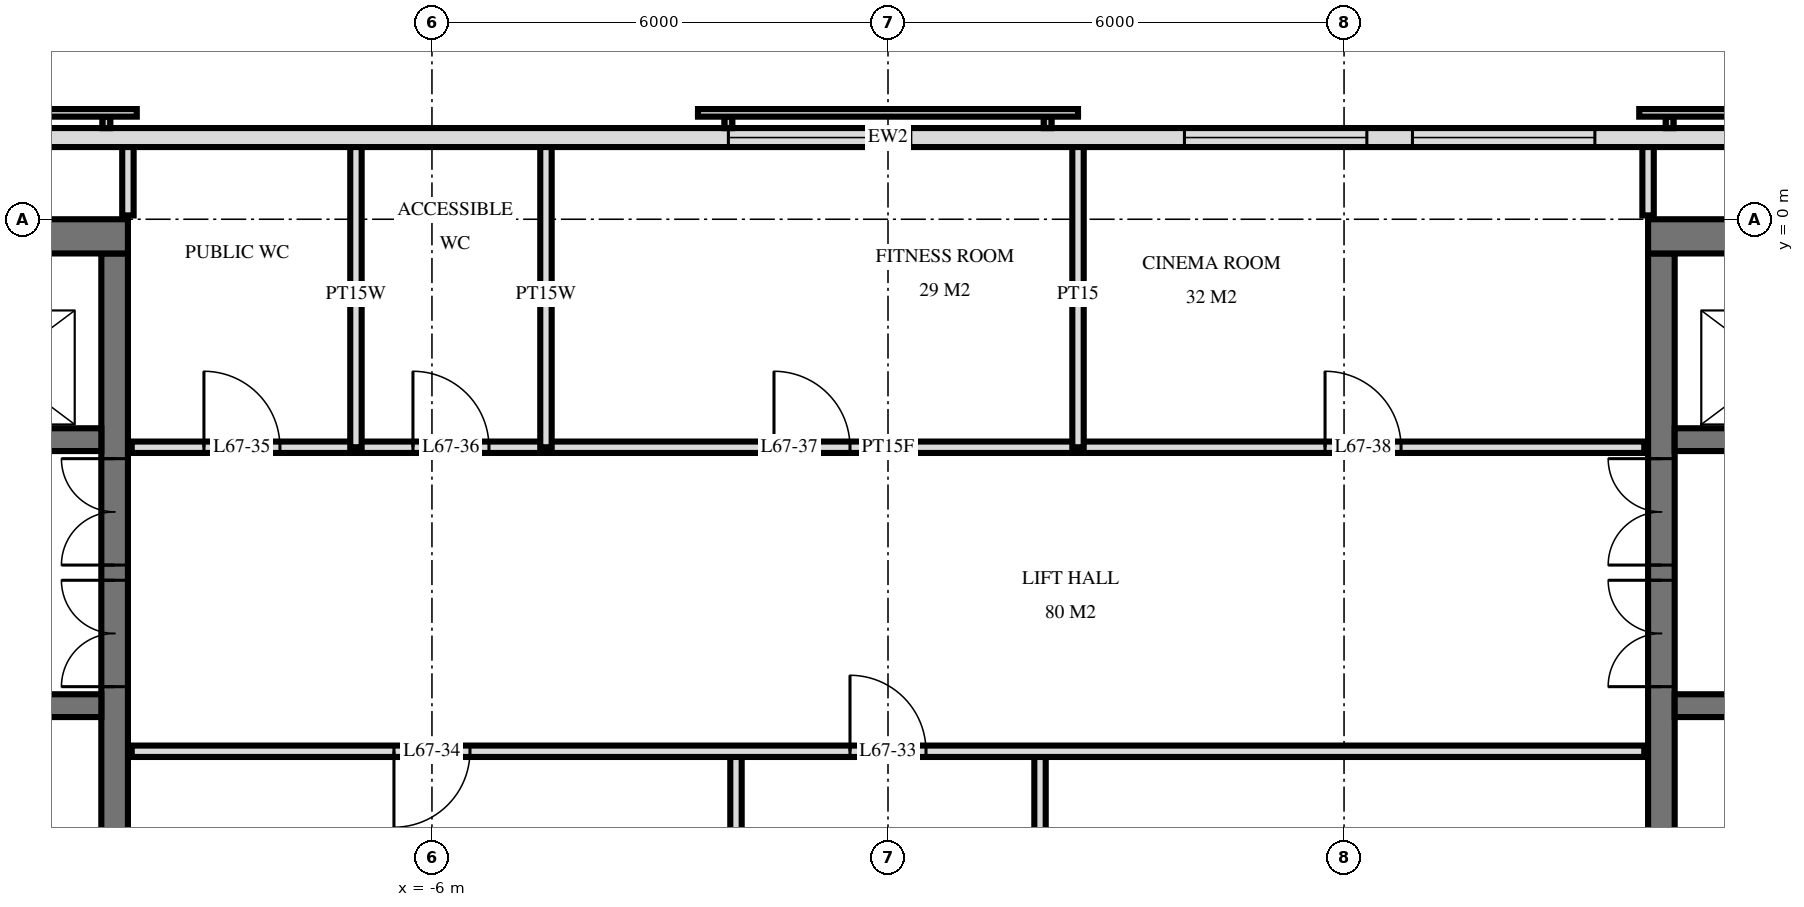
"""IFC4 building model, lengths in metres.
Left out: names, types, materials, properties, quantities, classifications, styles, units other than length and angle.
Written with IfcOpenShell. Run it as: python <this file> out.ifc"""

import sys

from ifc_helpers import new_model, si_unit, direction, frame, frame_2d, origin, place, context, subcontext, project, spatial, rectangle, extrude, element, fill, save


model = new_model("IFC4")
c1 = context("Model", 3, precision=1e-05, world=origin(), true_north=direction((0.0, 1.0)))
c2 = subcontext(c1, "Body", "Model", "MODEL_VIEW")
j1 = project(units=[si_unit("LENGTHUNIT", "METRE"), si_unit("PLANEANGLEUNIT", "RADIAN")], contexts=[c1])
p1 = place(None, origin())
s1 = spatial("IfcSite", under=j1, at=p1, CompositionType="ELEMENT")
p2 = place(p1, origin())
s2 = spatial("IfcBuilding", under=s1, at=p2, CompositionType="ELEMENT")
p3 = place(p2, frame((0.0, 0.0, 256.1)))
s3 = spatial("IfcBuildingStorey", under=s2, at=p3, CompositionType="ELEMENT", Elevation=256.1)
p4 = place(p3, frame((-19.5, -0.225, 0.0), z_axis=(0.0, 0.0, 1.0), x_axis=(1.0, 0.0, 0.0)))
e1 = element("IfcWall", 1, at=p4, inside=s3, PredefinedType="SHEAR", context=c2, shape_type="SweptSolid", body=[
    extrude(rectangle(XDim=9.5, YDim=0.45, at=frame_2d((4.75, 0.0))), origin(), (0.0, 0.0, 1.0), 3.5),
])
p5 = place(p3, frame((-10.175, -14.55, 0.0), z_axis=(0.0, 0.0, 1.0), x_axis=(0.0, 1.0, 0.0)))
e2 = element("IfcWall", 2, at=p5, inside=s3, PredefinedType="SHEAR", context=c2, shape_type="SweptSolid", body=[
    extrude(rectangle(XDim=14.1, YDim=0.35, at=frame_2d((7.05, 0.0))), origin(), (0.0, 0.0, 1.0), 3.5),
])
p6 = place(p5, frame((8.4, 0.0, 0.0)))
e3 = element("IfcOpeningElement", 3, at=p6, cuts=e2, PredefinedType="OPENING", context=c2, shape_type="SweptSolid", body=[
    extrude(rectangle(XDim=1.4, YDim=2.4, at=frame_2d((0.7, 1.2))), frame((0.0, 0.185, 0.0), z_axis=(0.0, -1.0, 0.0), x_axis=(1.0, 0.0, 0.0)), (0.0, 0.0, 1.0), 0.37),
])
p7 = place(p5, frame((10.0, 0.0, 0.0)))
e4 = element("IfcOpeningElement", 4, at=p7, cuts=e2, PredefinedType="OPENING", context=c2, shape_type="SweptSolid", body=[
    extrude(rectangle(XDim=1.4, YDim=2.4, at=frame_2d((0.7, 1.2))), frame((0.0, 0.185, 0.0), z_axis=(0.0, -1.0, 0.0), x_axis=(1.0, 0.0, 0.0)), (0.0, 0.0, 1.0), 0.37),
])
p8 = place(p5, frame((4.0, 0.0, 0.0)))
e5 = element("IfcOpeningElement", 5, at=p8, cuts=e2, PredefinedType="OPENING", context=c2, shape_type="SweptSolid", body=[
    extrude(rectangle(XDim=1.2, YDim=2.1, at=frame_2d((0.6, 1.05))), frame((0.0, 0.185, 0.0), z_axis=(0.0, -1.0, 0.0), x_axis=(1.0, 0.0, 0.0)), (0.0, 0.0, 1.0), 0.37),
])
p9 = place(p3, frame((-19.05, -2.9, 0.0), z_axis=(0.0, 0.0, 1.0), x_axis=(1.0, 0.0, 0.0)))
e6 = element("IfcWall", 6, at=p9, inside=s3, PredefinedType="SHEAR", context=c2, shape_type="SweptSolid", body=[
    extrude(rectangle(XDim=8.7, YDim=0.3, at=frame_2d((4.35, 0.0))), origin(), (0.0, 0.0, 1.0), 3.5),
])
p10 = place(p9, frame((6.8, 0.0, 0.0)))
e7 = element("IfcOpeningElement", 7, at=p10, cuts=e6, PredefinedType="OPENING", context=c2, shape_type="SweptSolid", body=[
    extrude(rectangle(XDim=1.1, YDim=2.1, at=frame_2d((0.55, 1.05))), frame((0.0, 0.16, 0.0), z_axis=(0.0, -1.0, 0.0), x_axis=(1.0, 0.0, 0.0)), (0.0, 0.0, 1.0), 0.32),
])
p11 = place(p9, frame((3.8, 0.0, 0.0)))
e8 = element("IfcOpeningElement", 8, at=p11, cuts=e6, PredefinedType="OPENING", context=c2, shape_type="SweptSolid", body=[
    extrude(rectangle(XDim=1.1, YDim=2.1, at=frame_2d((0.55, 1.05))), frame((0.0, 0.16, 0.0), z_axis=(0.0, -1.0, 0.0), x_axis=(1.0, 0.0, 0.0)), (0.0, 0.0, 1.0), 0.32),
])
p12 = place(p9, frame((1.863, 0.0, 0.0)))
e9 = element("IfcOpeningElement", 9, at=p12, cuts=e6, PredefinedType="OPENING", context=c2, shape_type="SweptSolid", body=[
    extrude(rectangle(XDim=0.9, YDim=2.1, at=frame_2d((0.45, 1.05))), frame((0.0, 0.16, 0.0), z_axis=(0.0, -1.0, 0.0), x_axis=(1.0, 0.0, 0.0)), (0.0, 0.0, 1.0), 0.32),
])
p13 = place(p9, frame((0.438, 0.0, 0.0)))
e10 = element("IfcOpeningElement", 10, at=p13, cuts=e6, PredefinedType="OPENING", context=c2, shape_type="SweptSolid", body=[
    extrude(rectangle(XDim=0.9, YDim=2.1, at=frame_2d((0.45, 1.05))), frame((0.0, 0.16, 0.0), z_axis=(0.0, -1.0, 0.0), x_axis=(1.0, 0.0, 0.0)), (0.0, 0.0, 1.0), 0.32),
])
p14 = place(p3, frame((-19.05, -6.4, 0.0), z_axis=(0.0, 0.0, 1.0), x_axis=(1.0, 0.0, 0.0)))
e11 = element("IfcWall", 11, at=p14, inside=s3, PredefinedType="SHEAR", context=c2, shape_type="SweptSolid", body=[
    extrude(rectangle(XDim=8.7, YDim=0.3, at=frame_2d((4.35, 0.0))), origin(), (0.0, 0.0, 1.0), 3.5),
])
p15 = place(p14, frame((0.8, 0.0, 0.0)))
e12 = element("IfcOpeningElement", 12, at=p15, cuts=e11, PredefinedType="OPENING", context=c2, shape_type="SweptSolid", body=[
    extrude(rectangle(XDim=1.1, YDim=2.1, at=frame_2d((0.55, 1.05))), frame((0.0, 0.16, 0.0), z_axis=(0.0, -1.0, 0.0), x_axis=(1.0, 0.0, 0.0)), (0.0, 0.0, 1.0), 0.32),
])
p16 = place(p3, frame((10.0, -0.225, 0.0), z_axis=(0.0, 0.0, 1.0), x_axis=(1.0, 0.0, 0.0)))
e13 = element("IfcWall", 13, at=p16, inside=s3, PredefinedType="SHEAR", context=c2, shape_type="SweptSolid", body=[
    extrude(rectangle(XDim=9.5, YDim=0.45, at=frame_2d((4.75, 0.0))), origin(), (0.0, 0.0, 1.0), 3.5),
])
p17 = place(p3, frame((10.175, -14.55, 0.0), z_axis=(0.0, 0.0, 1.0), x_axis=(0.0, 1.0, 0.0)))
e14 = element("IfcWall", 14, at=p17, inside=s3, PredefinedType="SHEAR", context=c2, shape_type="SweptSolid", body=[
    extrude(rectangle(XDim=14.1, YDim=0.35, at=frame_2d((7.05, 0.0))), origin(), (0.0, 0.0, 1.0), 3.5),
])
p18 = place(p17, frame((8.4, 0.0, 0.0)))
e15 = element("IfcOpeningElement", 15, at=p18, cuts=e14, PredefinedType="OPENING", context=c2, shape_type="SweptSolid", body=[
    extrude(rectangle(XDim=1.4, YDim=2.4, at=frame_2d((0.7, 1.2))), frame((0.0, 0.185, 0.0), z_axis=(0.0, -1.0, 0.0), x_axis=(1.0, 0.0, 0.0)), (0.0, 0.0, 1.0), 0.37),
])
p19 = place(p17, frame((10.0, 0.0, 0.0)))
e16 = element("IfcOpeningElement", 16, at=p19, cuts=e14, PredefinedType="OPENING", context=c2, shape_type="SweptSolid", body=[
    extrude(rectangle(XDim=1.4, YDim=2.4, at=frame_2d((0.7, 1.2))), frame((0.0, 0.185, 0.0), z_axis=(0.0, -1.0, 0.0), x_axis=(1.0, 0.0, 0.0)), (0.0, 0.0, 1.0), 0.37),
])
p20 = place(p17, frame((4.0, 0.0, 0.0)))
e17 = element("IfcOpeningElement", 17, at=p20, cuts=e14, PredefinedType="OPENING", context=c2, shape_type="SweptSolid", body=[
    extrude(rectangle(XDim=1.2, YDim=2.1, at=frame_2d((0.6, 1.05))), frame((0.0, 0.185, 0.0), z_axis=(0.0, -1.0, 0.0), x_axis=(1.0, 0.0, 0.0)), (0.0, 0.0, 1.0), 0.37),
])
p21 = place(p3, frame((10.35, -2.9, 0.0), z_axis=(0.0, 0.0, 1.0), x_axis=(1.0, 0.0, 0.0)))
e18 = element("IfcWall", 18, at=p21, inside=s3, PredefinedType="SHEAR", context=c2, shape_type="SweptSolid", body=[
    extrude(rectangle(XDim=8.7, YDim=0.3, at=frame_2d((4.35, 0.0))), origin(), (0.0, 0.0, 1.0), 3.5),
])
p22 = place(p21, frame((0.8, 0.0, 0.0)))
e19 = element("IfcOpeningElement", 19, at=p22, cuts=e18, PredefinedType="OPENING", context=c2, shape_type="SweptSolid", body=[
    extrude(rectangle(XDim=1.1, YDim=2.1, at=frame_2d((0.55, 1.05))), frame((0.0, 0.16, 0.0), z_axis=(0.0, -1.0, 0.0), x_axis=(1.0, 0.0, 0.0)), (0.0, 0.0, 1.0), 0.32),
])
p23 = place(p21, frame((3.8, 0.0, 0.0)))
e20 = element("IfcOpeningElement", 20, at=p23, cuts=e18, PredefinedType="OPENING", context=c2, shape_type="SweptSolid", body=[
    extrude(rectangle(XDim=1.1, YDim=2.1, at=frame_2d((0.55, 1.05))), frame((0.0, 0.16, 0.0), z_axis=(0.0, -1.0, 0.0), x_axis=(1.0, 0.0, 0.0)), (0.0, 0.0, 1.0), 0.32),
])
p24 = place(p21, frame((5.938, 0.0, 0.0)))
e21 = element("IfcOpeningElement", 21, at=p24, cuts=e18, PredefinedType="OPENING", context=c2, shape_type="SweptSolid", body=[
    extrude(rectangle(XDim=0.9, YDim=2.1, at=frame_2d((0.45, 1.05))), frame((0.0, 0.16, 0.0), z_axis=(0.0, -1.0, 0.0), x_axis=(1.0, 0.0, 0.0)), (0.0, 0.0, 1.0), 0.32),
])
p25 = place(p21, frame((7.363, 0.0, 0.0)))
e22 = element("IfcOpeningElement", 22, at=p25, cuts=e18, PredefinedType="OPENING", context=c2, shape_type="SweptSolid", body=[
    extrude(rectangle(XDim=0.9, YDim=2.1, at=frame_2d((0.45, 1.05))), frame((0.0, 0.16, 0.0), z_axis=(0.0, -1.0, 0.0), x_axis=(1.0, 0.0, 0.0)), (0.0, 0.0, 1.0), 0.32),
])
p26 = place(p3, frame((10.35, -6.4, 0.0), z_axis=(0.0, 0.0, 1.0), x_axis=(1.0, 0.0, 0.0)))
e23 = element("IfcWall", 23, at=p26, inside=s3, PredefinedType="SHEAR", context=c2, shape_type="SweptSolid", body=[
    extrude(rectangle(XDim=8.7, YDim=0.3, at=frame_2d((4.35, 0.0))), origin(), (0.0, 0.0, 1.0), 3.5),
])
p27 = place(p26, frame((6.8, 0.0, 0.0)))
e24 = element("IfcOpeningElement", 24, at=p27, cuts=e23, PredefinedType="OPENING", context=c2, shape_type="SweptSolid", body=[
    extrude(rectangle(XDim=1.1, YDim=2.1, at=frame_2d((0.55, 1.05))), frame((0.0, 0.16, 0.0), z_axis=(0.0, -1.0, 0.0), x_axis=(1.0, 0.0, 0.0)), (0.0, 0.0, 1.0), 0.32),
])
p28 = place(p3, frame((18.575, 1.075, 0.0), z_axis=(0.0, 0.0, 1.0), x_axis=(-1.0, 0.0, 0.0)))
e25 = element("IfcWall", 25, at=p28, inside=s3, PredefinedType="SOLIDWALL", context=c2, shape_type="SweptSolid", body=[
    extrude(rectangle(XDim=37.151, YDim=0.25, at=frame_2d((18.575, 0.0))), origin(), (0.0, 0.0, 1.0), 3.22),
])
p29 = place(p28, frame((9.275, 0.0, 0.9)))
e26 = element("IfcOpeningElement", 26, at=p29, cuts=e25, PredefinedType="OPENING", context=c2, shape_type="SweptSolid", body=[
    extrude(rectangle(XDim=2.4, YDim=1.5, at=frame_2d((1.2, 0.75))), frame((0.0, 0.135, 0.0), z_axis=(0.0, -1.0, 0.0), x_axis=(1.0, 0.0, 0.0)), (0.0, 0.0, 1.0), 0.27),
])
p30 = place(p28, frame((12.275, 0.0, 0.9)))
e27 = element("IfcOpeningElement", 27, at=p30, cuts=e25, PredefinedType="OPENING", context=c2, shape_type="SweptSolid", body=[
    extrude(rectangle(XDim=2.4, YDim=1.5, at=frame_2d((1.2, 0.75))), frame((0.0, 0.135, 0.0), z_axis=(0.0, -1.0, 0.0), x_axis=(1.0, 0.0, 0.0)), (0.0, 0.0, 1.0), 0.27),
])
p31 = place(p28, frame((18.275, 0.0, 0.9)))
e28 = element("IfcOpeningElement", 28, at=p31, cuts=e25, PredefinedType="OPENING", context=c2, shape_type="SweptSolid", body=[
    extrude(rectangle(XDim=2.4, YDim=1.5, at=frame_2d((1.2, 0.75))), frame((0.0, 0.135, 0.0), z_axis=(0.0, -1.0, 0.0), x_axis=(1.0, 0.0, 0.0)), (0.0, 0.0, 1.0), 0.27),
])
p32 = place(p3, frame((10.0, 0.05, 0.0), z_axis=(0.0, 0.0, 1.0), x_axis=(0.0, 1.0, 0.0)))
e29 = element("IfcWall", 29, at=p32, inside=s3, PredefinedType="PARTITIONING", context=c2, shape_type="SweptSolid", body=[
    extrude(rectangle(XDim=0.97, YDim=0.15, at=frame_2d((0.485, 0.0))), origin(), (0.0, 0.0, 1.0), 3.22),
])
p33 = place(p3, frame((2.5, -3.0, 0.0), z_axis=(0.0, 0.0, 1.0), x_axis=(0.0, 1.0, 0.0)))
e30 = element("IfcWall", 30, at=p33, inside=s3, PredefinedType="PARTITIONING", context=c2, shape_type="SweptSolid", body=[
    extrude(rectangle(XDim=4.02, YDim=0.15, at=frame_2d((2.01, 0.0))), origin(), (0.0, 0.0, 1.0), 3.22),
])
for number, where, z_axis, x_axis in (
    (31, (2.0, -11.0, 0.0), (0.0, 0.0, 1.0), (0.0, 1.0, 0.0)),
    (32, (-2.0, -11.0, 0.0), (0.0, 0.0, 1.0), (0.0, 1.0, 0.0)),
):
    element("IfcWall", number, at=place(p3, frame(where, z_axis=z_axis, x_axis=x_axis)), inside=s3, PredefinedType="PARTITIONING", context=c2, shape_type="SweptSolid", body=[
        extrude(rectangle(XDim=4.0, YDim=0.15, at=frame_2d((2.0, 0.0))), origin(), (0.0, 0.0, 1.0), 3.22),
    ])
for number, where, z_axis, x_axis in (
    (33, (-4.5, -3.0, 0.0), (0.0, 0.0, 1.0), (0.0, 1.0, 0.0)),
    (34, (-7.0, -3.0, 0.0), (0.0, 0.0, 1.0), (0.0, 1.0, 0.0)),
):
    element("IfcWall", number, at=place(p3, frame(where, z_axis=z_axis, x_axis=x_axis)), inside=s3, PredefinedType="PLUMBINGWALL", context=c2, shape_type="SweptSolid", body=[
        extrude(rectangle(XDim=4.02, YDim=0.15, at=frame_2d((2.01, 0.0))), origin(), (0.0, 0.0, 1.0), 3.22),
    ])
p34 = place(p3, frame((-10.0, 0.05, 0.0), z_axis=(0.0, 0.0, 1.0), x_axis=(0.0, 1.0, 0.0)))
e35 = element("IfcWall", 35, at=p34, inside=s3, PredefinedType="PLUMBINGWALL", context=c2, shape_type="SweptSolid", body=[
    extrude(rectangle(XDim=0.97, YDim=0.15, at=frame_2d((0.485, 0.0))), origin(), (0.0, 0.0, 1.0), 3.22),
])
p35 = place(p3, frame((-9.95, -7.0, 0.0), z_axis=(0.0, 0.0, 1.0), x_axis=(1.0, 0.0, 0.0)))
e36 = element("IfcWall", 36, at=p35, inside=s3, PredefinedType="PARTITIONING", context=c2, shape_type="SweptSolid", body=[
    extrude(rectangle(XDim=19.9, YDim=0.15, at=frame_2d((9.95, 0.0))), origin(), (0.0, 0.0, 1.0), 3.22),
])
p36 = place(p35, frame((9.45, 0.0, 0.0)))
e37 = element("IfcOpeningElement", 37, at=p36, cuts=e36, PredefinedType="OPENING", context=c2, shape_type="SweptSolid", body=[
    extrude(rectangle(XDim=1.0, YDim=2.1, at=frame_2d((0.5, 1.05))), frame((0.0, 0.085, 0.0), z_axis=(0.0, -1.0, 0.0), x_axis=(1.0, 0.0, 0.0)), (0.0, 0.0, 1.0), 0.17),
])
p37 = place(p35, frame((3.45, 0.0, 0.0)))
e38 = element("IfcOpeningElement", 38, at=p37, cuts=e36, PredefinedType="OPENING", context=c2, shape_type="SweptSolid", body=[
    extrude(rectangle(XDim=1.0, YDim=2.1, at=frame_2d((0.5, 1.05))), frame((0.0, 0.085, 0.0), z_axis=(0.0, -1.0, 0.0), x_axis=(1.0, 0.0, 0.0)), (0.0, 0.0, 1.0), 0.17),
])
p38 = place(p3, frame((-9.95, -3.0, 0.0), z_axis=(0.0, 0.0, 1.0), x_axis=(1.0, 0.0, 0.0)))
e39 = element("IfcWall", 39, at=p38, inside=s3, PredefinedType="PARTITIONING", context=c2, shape_type="SweptSolid", body=[
    extrude(rectangle(XDim=19.9, YDim=0.15, at=frame_2d((9.95, 0.0))), origin(), (0.0, 0.0, 1.0), 3.22),
])
p39 = place(p38, frame((0.95, 0.0, 0.0)))
e40 = element("IfcOpeningElement", 40, at=p39, cuts=e39, PredefinedType="OPENING", context=c2, shape_type="SweptSolid", body=[
    extrude(rectangle(XDim=1.0, YDim=2.1, at=frame_2d((0.5, 1.05))), frame((0.0, 0.085, 0.0), z_axis=(0.0, -1.0, 0.0), x_axis=(1.0, 0.0, 0.0)), (0.0, 0.0, 1.0), 0.17),
])
p40 = place(p38, frame((3.7, 0.0, 0.0)))
e41 = element("IfcOpeningElement", 41, at=p40, cuts=e39, PredefinedType="OPENING", context=c2, shape_type="SweptSolid", body=[
    extrude(rectangle(XDim=1.0, YDim=2.1, at=frame_2d((0.5, 1.05))), frame((0.0, 0.085, 0.0), z_axis=(0.0, -1.0, 0.0), x_axis=(1.0, 0.0, 0.0)), (0.0, 0.0, 1.0), 0.17),
])
p41 = place(p38, frame((8.45, 0.0, 0.0)))
e42 = element("IfcOpeningElement", 42, at=p41, cuts=e39, PredefinedType="OPENING", context=c2, shape_type="SweptSolid", body=[
    extrude(rectangle(XDim=1.0, YDim=2.1, at=frame_2d((0.5, 1.05))), frame((0.0, 0.085, 0.0), z_axis=(0.0, -1.0, 0.0), x_axis=(1.0, 0.0, 0.0)), (0.0, 0.0, 1.0), 0.17),
])
p42 = place(p38, frame((15.7, 0.0, 0.0)))
e43 = element("IfcOpeningElement", 43, at=p42, cuts=e39, PredefinedType="OPENING", context=c2, shape_type="SweptSolid", body=[
    extrude(rectangle(XDim=1.0, YDim=2.1, at=frame_2d((0.5, 1.05))), frame((0.0, 0.085, 0.0), z_axis=(0.0, -1.0, 0.0), x_axis=(1.0, 0.0, 0.0)), (0.0, 0.0, 1.0), 0.17),
])
p43 = place(p29, origin())
e44 = element("IfcWindow", 44, at=p43, inside=s3, PartitioningType="SINGLE_PANEL", PredefinedType="WINDOW", context=c2, shape_type="SweptSolid", body=[
    extrude(rectangle(XDim=2.4, YDim=1.5, at=frame_2d((1.2, 0.75))), frame((0.0, 0.03, 0.0), z_axis=(0.0, -1.0, 0.0), x_axis=(1.0, 0.0, 0.0)), (0.0, 0.0, 1.0), 0.06),
])
fill(e26, e44)
p44 = place(p30, origin())
e45 = element("IfcWindow", 45, at=p44, inside=s3, PartitioningType="SINGLE_PANEL", PredefinedType="WINDOW", context=c2, shape_type="SweptSolid", body=[
    extrude(rectangle(XDim=2.4, YDim=1.5, at=frame_2d((1.2, 0.75))), frame((0.0, 0.03, 0.0), z_axis=(0.0, -1.0, 0.0), x_axis=(1.0, 0.0, 0.0)), (0.0, 0.0, 1.0), 0.06),
])
fill(e27, e45)
p45 = place(p31, origin())
e46 = element("IfcWindow", 46, at=p45, inside=s3, PartitioningType="SINGLE_PANEL", PredefinedType="WINDOW", context=c2, shape_type="SweptSolid", body=[
    extrude(rectangle(XDim=2.4, YDim=1.5, at=frame_2d((1.2, 0.75))), frame((0.0, 0.03, 0.0), z_axis=(0.0, -1.0, 0.0), x_axis=(1.0, 0.0, 0.0)), (0.0, 0.0, 1.0), 0.06),
])
fill(e28, e46)
p46 = place(p6, origin())
e47 = element("IfcDoor", 47, at=p46, inside=s3, OperationType="DOUBLE_DOOR_SINGLE_SWING", PredefinedType="DOOR", context=c2, shape_type="SweptSolid", body=[
    extrude(rectangle(XDim=1.4, YDim=2.4, at=frame_2d((0.7, 1.2))), frame((0.0, 0.025, 0.0), z_axis=(0.0, -1.0, 0.0), x_axis=(1.0, 0.0, 0.0)), (0.0, 0.0, 1.0), 0.05),
])
fill(e3, e47)
p47 = place(p7, origin())
e48 = element("IfcDoor", 48, at=p47, inside=s3, OperationType="DOUBLE_DOOR_SINGLE_SWING", PredefinedType="DOOR", context=c2, shape_type="SweptSolid", body=[
    extrude(rectangle(XDim=1.4, YDim=2.4, at=frame_2d((0.7, 1.2))), frame((0.0, 0.025, 0.0), z_axis=(0.0, -1.0, 0.0), x_axis=(1.0, 0.0, 0.0)), (0.0, 0.0, 1.0), 0.05),
])
fill(e4, e48)
p48 = place(p18, origin())
e49 = element("IfcDoor", 49, at=p48, inside=s3, OperationType="DOUBLE_DOOR_SINGLE_SWING", PredefinedType="DOOR", context=c2, shape_type="SweptSolid", body=[
    extrude(rectangle(XDim=1.4, YDim=2.4, at=frame_2d((0.7, 1.2))), frame((0.0, 0.025, 0.0), z_axis=(0.0, -1.0, 0.0), x_axis=(1.0, 0.0, 0.0)), (0.0, 0.0, 1.0), 0.05),
])
fill(e15, e49)
p49 = place(p19, origin())
e50 = element("IfcDoor", 50, at=p49, inside=s3, OperationType="DOUBLE_DOOR_SINGLE_SWING", PredefinedType="DOOR", context=c2, shape_type="SweptSolid", body=[
    extrude(rectangle(XDim=1.4, YDim=2.4, at=frame_2d((0.7, 1.2))), frame((0.0, 0.025, 0.0), z_axis=(0.0, -1.0, 0.0), x_axis=(1.0, 0.0, 0.0)), (0.0, 0.0, 1.0), 0.05),
])
fill(e16, e50)
p50 = place(p36, origin())
e51 = element("IfcDoor", 51, at=p50, inside=s3, OperationType="SINGLE_SWING_RIGHT", PredefinedType="DOOR", context=c2, shape_type="SweptSolid", body=[
    extrude(rectangle(XDim=1.0, YDim=2.1, at=frame_2d((0.5, 1.05))), frame((0.0, 0.025, 0.0), z_axis=(0.0, -1.0, 0.0), x_axis=(1.0, 0.0, 0.0)), (0.0, 0.0, 1.0), 0.05),
])
fill(e37, e51)
p51 = place(p37, frame((0.5, 0.0, 0.0), z_axis=(0.0, 0.0, 1.0), x_axis=(-1.0, 0.0, 0.0)))
e52 = element("IfcDoor", 52, at=p51, inside=s3, OperationType="SINGLE_SWING_LEFT", PredefinedType="DOOR", context=c2, shape_type="SweptSolid", body=[
    extrude(rectangle(XDim=1.0, YDim=2.1, at=frame_2d((0.0, 1.05))), frame((0.0, -0.025, 0.0), z_axis=(0.0, 1.0, 0.0), x_axis=(-1.0, 0.0, 0.0)), (0.0, 0.0, 1.0), 0.05),
])
fill(e38, e52)
p52 = place(p39, origin())
e53 = element("IfcDoor", 53, at=p52, inside=s3, OperationType="SINGLE_SWING_RIGHT", PredefinedType="DOOR", context=c2, shape_type="SweptSolid", body=[
    extrude(rectangle(XDim=1.0, YDim=2.1, at=frame_2d((0.5, 1.05))), frame((0.0, 0.025, 0.0), z_axis=(0.0, -1.0, 0.0), x_axis=(1.0, 0.0, 0.0)), (0.0, 0.0, 1.0), 0.05),
])
fill(e40, e53)
p53 = place(p40, origin())
e54 = element("IfcDoor", 54, at=p53, inside=s3, OperationType="SINGLE_SWING_RIGHT", PredefinedType="DOOR", context=c2, shape_type="SweptSolid", body=[
    extrude(rectangle(XDim=1.0, YDim=2.1, at=frame_2d((0.5, 1.05))), frame((0.0, 0.025, 0.0), z_axis=(0.0, -1.0, 0.0), x_axis=(1.0, 0.0, 0.0)), (0.0, 0.0, 1.0), 0.05),
])
fill(e41, e54)
p54 = place(p41, origin())
e55 = element("IfcDoor", 55, at=p54, inside=s3, OperationType="SINGLE_SWING_RIGHT", PredefinedType="DOOR", context=c2, shape_type="SweptSolid", body=[
    extrude(rectangle(XDim=1.0, YDim=2.1, at=frame_2d((0.5, 1.05))), frame((0.0, 0.025, 0.0), z_axis=(0.0, -1.0, 0.0), x_axis=(1.0, 0.0, 0.0)), (0.0, 0.0, 1.0), 0.05),
])
fill(e42, e55)
p55 = place(p42, origin())
e56 = element("IfcDoor", 56, at=p55, inside=s3, OperationType="SINGLE_SWING_RIGHT", PredefinedType="DOOR", context=c2, shape_type="SweptSolid", body=[
    extrude(rectangle(XDim=1.0, YDim=2.1, at=frame_2d((0.5, 1.05))), frame((0.0, 0.025, 0.0), z_axis=(0.0, -1.0, 0.0), x_axis=(1.0, 0.0, 0.0)), (0.0, 0.0, 1.0), 0.05),
])
fill(e43, e56)
save(model, sys.argv[1])
